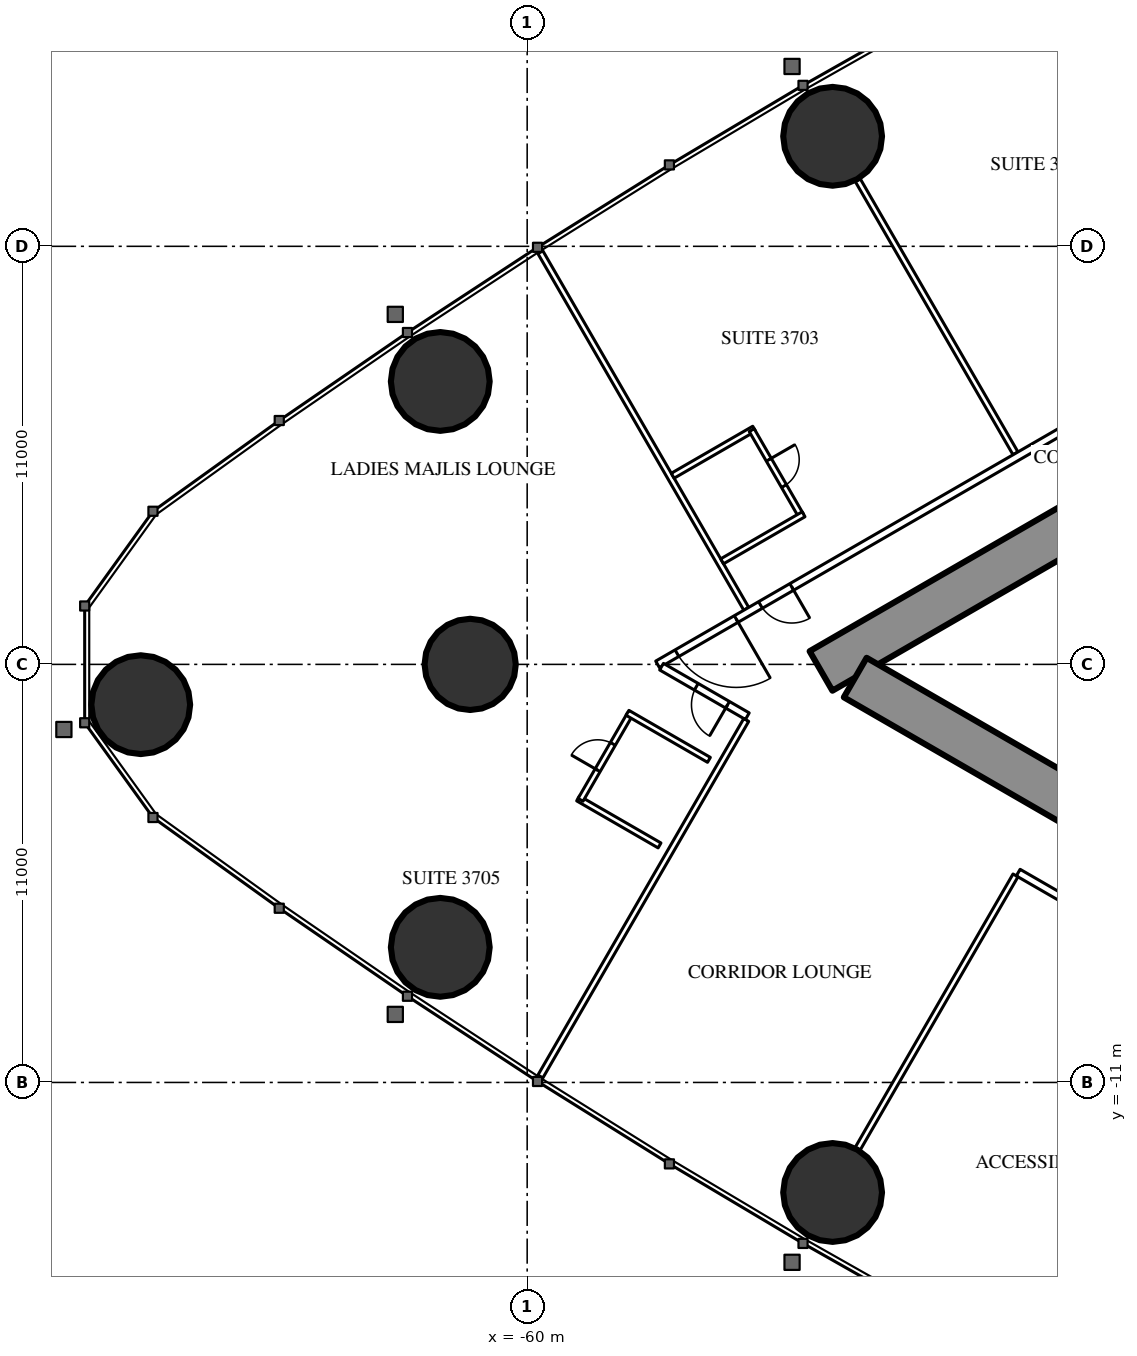
"""IFC4 building model, lengths in metres.
Left out: names, types, materials, properties, quantities, classifications, styles, units other than length and angle.
Written with IfcOpenShell. Run it as: python <this file> out.ifc"""

import sys

from ifc_helpers import new_model, si_unit, direction, frame, frame_2d, origin, origin_2d, place, context, subcontext, project, spatial, rectangle, circle, hollow_circle, extrude, element, fill, save


model = new_model("IFC4")
c1 = context("Model", 3, precision=1e-05, world=origin(), true_north=direction((0.0, 1.0)))
c2 = subcontext(c1, "Body", "Model", "MODEL_VIEW")
j1 = project(units=[si_unit("LENGTHUNIT", "METRE"), si_unit("PLANEANGLEUNIT", "RADIAN")], contexts=[c1])
p1 = place(None, origin())
s1 = spatial("IfcSite", under=j1, at=p1, CompositionType="ELEMENT")
p2 = place(p1, origin())
s2 = spatial("IfcBuilding", under=s1, at=p2, CompositionType="ELEMENT")
p3 = place(p2, frame((0.0, 0.0, 139.6)))
s3 = spatial("IfcBuildingStorey", under=s2, at=p3, CompositionType="ELEMENT", Elevation=139.6)
for number, where, z_axis, x_axis in (
    (1, (-70.168, -1.06, 0.0), (0.0, 0.0, 1.0), (1.0, 0.0, 0.0)),
    (2, (-62.287, -7.445, 0.0), (0.0, 0.0, 1.0), (1.0, 0.0, 0.0)),
    (3, (-51.963, -13.895, 0.0), (0.0, 0.0, 1.0), (1.0, 0.0, 0.0)),
    (4, (-51.963, 13.895, 0.0), (0.0, 0.0, 1.0), (1.0, 0.0, 0.0)),
    (5, (-62.287, 7.445, 0.0), (0.0, 0.0, 1.0), (1.0, 0.0, 0.0)),
):
    element("IfcColumn", number, at=place(p3, frame(where, z_axis=z_axis, x_axis=x_axis)), inside=s3, PredefinedType="COLUMN", context=c2, shape_type="SweptSolid", body=[
        extrude(hollow_circle(Radius=1.3, WallThickness=0.1, at=origin_2d()), origin(), (0.0, 0.0, 1.0), 3.5),
    ])
p4 = place(p3, frame((-61.5, 0.0, 0.0), z_axis=(0.0, 0.0, 1.0), x_axis=(1.0, 0.0, 0.0)))
e6 = element("IfcColumn", 6, at=p4, inside=s3, PredefinedType="COLUMN", context=c2, shape_type="SweptSolid", body=[
    extrude(circle(Radius=1.2, at=origin_2d()), origin(), (0.0, 0.0, 1.0), 3.5),
])
p5 = place(p3, frame((-27.2, 14.3, 0.0), z_axis=(0.0, 0.0, 1.0), x_axis=(-0.866026593062, -0.499997940104, 0.0)))
e7 = element("IfcWall", 7, at=p5, inside=s3, PredefinedType="SHEAR", context=c2, shape_type="SweptSolid", body=[
    extrude(rectangle(XDim=28.946, YDim=1.2, at=frame_2d((14.473, 0.0))), origin(), (0.0, 0.0, 1.0), 3.5),
])
p6 = place(p5, frame((4.6, 0.0, 0.0)))
e8 = element("IfcOpeningElement", 8, at=p6, cuts=e7, PredefinedType="OPENING", context=c2, shape_type="SweptSolid", body=[
    extrude(rectangle(XDim=1.0, YDim=2.2, at=frame_2d((0.5, 1.1))), frame((0.0, 0.61, 0.0), z_axis=(0.0, -1.0, 0.0), x_axis=(1.0, 0.0, 0.0)), (0.0, 0.0, 1.0), 1.22),
])
p7 = place(p5, frame((13.395, 0.0, 0.0)))
e9 = element("IfcOpeningElement", 9, at=p7, cuts=e7, PredefinedType="OPENING", context=c2, shape_type="SweptSolid", body=[
    extrude(rectangle(XDim=1.8, YDim=2.2, at=frame_2d((0.9, 1.1))), frame((0.0, 0.61, 0.0), z_axis=(0.0, -1.0, 0.0), x_axis=(1.0, 0.0, 0.0)), (0.0, 0.0, 1.0), 1.22),
])
p8 = place(p3, frame((-27.2, -14.3, 0.0), z_axis=(0.0, 0.0, 1.0), x_axis=(-0.866024021859, 0.500002393557, 0.0)))
e10 = element("IfcWall", 10, at=p8, inside=s3, PredefinedType="SHEAR", context=c2, shape_type="SweptSolid", body=[
    extrude(rectangle(XDim=27.907, YDim=1.2, at=frame_2d((13.954, 0.0))), origin(), (0.0, 0.0, 1.0), 3.5),
])
p9 = place(p8, frame((4.6, 0.0, 0.0)))
e11 = element("IfcOpeningElement", 11, at=p9, cuts=e10, PredefinedType="OPENING", context=c2, shape_type="SweptSolid", body=[
    extrude(rectangle(XDim=1.0, YDim=2.2, at=frame_2d((0.5, 1.1))), frame((0.0, 0.61, 0.0), z_axis=(0.0, -1.0, 0.0), x_axis=(1.0, 0.0, 0.0)), (0.0, 0.0, 1.0), 1.22),
])
p10 = place(p8, frame((13.395, 0.0, 0.0)))
e12 = element("IfcOpeningElement", 12, at=p10, cuts=e10, PredefinedType="OPENING", context=c2, shape_type="SweptSolid", body=[
    extrude(rectangle(XDim=1.8, YDim=2.2, at=frame_2d((0.9, 1.1))), frame((0.0, 0.61, 0.0), z_axis=(0.0, -1.0, 0.0), x_axis=(1.0, 0.0, 0.0)), (0.0, 0.0, 1.0), 1.22),
])
p11 = place(p3, frame((-47.151, 5.552, 0.0), z_axis=(0.0, 0.0, 1.0), x_axis=(-0.500003012045, 0.866023664773, 0.0)))
e13 = element("IfcWall", 13, at=p11, inside=s3, PredefinedType="PARTITIONING", context=c2, shape_type="SweptSolid", body=[
    extrude(rectangle(XDim=8.311, YDim=0.15, at=frame_2d((4.156, 0.0))), origin(), (0.0, 0.0, 1.0), 2.2),
])
p12 = place(p3, frame((-54.236, 1.462, 0.0), z_axis=(0.0, 0.0, 1.0), x_axis=(-0.499990351854, 0.866030974073, 0.0)))
e14 = element("IfcWall", 14, at=p12, inside=s3, PredefinedType="PARTITIONING", context=c2, shape_type="SweptSolid", body=[
    extrude(rectangle(XDim=10.834, YDim=0.15, at=frame_2d((5.417, 0.0))), origin(), (0.0, 0.0, 1.0), 3.25),
])
p13 = place(p3, frame((-47.151, -5.552, 0.0), z_axis=(0.0, 0.0, 1.0), x_axis=(-0.500003012045, -0.866023664773, 0.0)))
e15 = element("IfcWall", 15, at=p13, inside=s3, PredefinedType="PARTITIONING", context=c2, shape_type="SweptSolid", body=[
    extrude(rectangle(XDim=8.311, YDim=0.15, at=frame_2d((4.156, 0.0))), origin(), (0.0, 0.0, 1.0), 2.2),
])
p14 = place(p3, frame((-54.236, -1.462, 0.0), z_axis=(0.0, 0.0, 1.0), x_axis=(-0.499990351854, -0.866030974073, 0.0)))
e16 = element("IfcWall", 16, at=p14, inside=s3, PredefinedType="PARTITIONING", context=c2, shape_type="SweptSolid", body=[
    extrude(rectangle(XDim=10.834, YDim=0.15, at=frame_2d((5.417, 0.0))), origin(), (0.0, 0.0, 1.0), 3.25),
])
p15 = place(p3, frame((-37.7, 10.894, 0.0), z_axis=(0.0, 0.0, 1.0), x_axis=(-0.866027905338, -0.499995667157, 0.0)))
e17 = element("IfcWall", 17, at=p15, inside=s3, PredefinedType="PARTITIONING", context=c2, shape_type="SweptSolid", body=[
    extrude(rectangle(XDim=21.787, YDim=0.2, at=frame_2d((10.894, 0.0))), origin(), (0.0, 0.0, 1.0), 3.25),
])
p16 = place(p15, frame((17.711, 0.0, 0.0)))
e18 = element("IfcOpeningElement", 18, at=p16, cuts=e17, PredefinedType="OPENING", context=c2, shape_type="SweptSolid", body=[
    extrude(rectangle(XDim=0.95, YDim=2.2, at=frame_2d((0.475, 1.1))), frame((0.0, 0.11, 0.0), z_axis=(0.0, -1.0, 0.0), x_axis=(1.0, 0.0, 0.0)), (0.0, 0.0, 1.0), 0.22),
])
p17 = place(p15, frame((19.399, 0.0, 0.0)))
e19 = element("IfcOpeningElement", 19, at=p17, cuts=e17, PredefinedType="OPENING", context=c2, shape_type="SweptSolid", body=[
    extrude(rectangle(XDim=1.8, YDim=2.2, at=frame_2d((0.9, 1.1))), frame((0.0, 0.11, 0.0), z_axis=(0.0, -1.0, 0.0), x_axis=(1.0, 0.0, 0.0)), (0.0, 0.0, 1.0), 0.22),
])
p18 = place(p15, frame((0.6, 0.0, 0.0)))
e20 = element("IfcOpeningElement", 20, at=p18, cuts=e17, PredefinedType="OPENING", context=c2, shape_type="SweptSolid", body=[
    extrude(rectangle(XDim=0.95, YDim=2.2, at=frame_2d((0.475, 1.1))), frame((0.0, 0.11, 0.0), z_axis=(0.0, -1.0, 0.0), x_axis=(1.0, 0.0, 0.0)), (0.0, 0.0, 1.0), 0.22),
])
p19 = place(p3, frame((-36.92, -11.344, 0.0), z_axis=(0.0, 0.0, 1.0), x_axis=(-0.866027897759, 0.499995680284, 0.0)))
e21 = element("IfcWall", 21, at=p19, inside=s3, PredefinedType="PARTITIONING", context=c2, shape_type="SweptSolid", body=[
    extrude(rectangle(XDim=11.731, YDim=0.2, at=frame_2d((5.865, 0.0))), origin(), (0.0, 0.0, 1.0), 3.25),
])
p20 = place(p19, frame((3.35, 0.0, 0.0)))
e22 = element("IfcOpeningElement", 22, at=p20, cuts=e21, PredefinedType="OPENING", context=c2, shape_type="SweptSolid", body=[
    extrude(rectangle(XDim=1.0, YDim=2.2, at=frame_2d((0.5, 1.1))), frame((0.0, 0.11, 0.0), z_axis=(0.0, -1.0, 0.0), x_axis=(1.0, 0.0, 0.0)), (0.0, 0.0, 1.0), 0.22),
])
p21 = place(p3, frame((-54.207, -1.363, 0.0), z_axis=(0.0, 0.0, 1.0), x_axis=(-0.866049872286, 0.499957616916, 0.0)))
e23 = element("IfcWall", 23, at=p21, inside=s3, PredefinedType="PARTITIONING", context=c2, shape_type="SweptSolid", body=[
    extrude(rectangle(XDim=2.606, YDim=0.2, at=frame_2d((1.303, 0.0))), origin(), (0.0, 0.0, 1.0), 3.25),
])
p22 = place(p21, frame((0.6, 0.0, 0.0)))
e24 = element("IfcOpeningElement", 24, at=p22, cuts=e23, PredefinedType="OPENING", context=c2, shape_type="SweptSolid", body=[
    extrude(rectangle(XDim=0.95, YDim=2.2, at=frame_2d((0.475, 1.1))), frame((0.0, 0.11, 0.0), z_axis=(0.0, -1.0, 0.0), x_axis=(1.0, 0.0, 0.0)), (0.0, 0.0, 1.0), 0.22),
])
p23 = place(p3, frame((-54.027, 6.201, 0.0), z_axis=(0.0, 0.0, 1.0), x_axis=(-0.866006523861, -0.500032699561, 0.0)))
e25 = element("IfcWall", 25, at=p23, inside=s3, PredefinedType="PARTITIONING", context=c2, shape_type="SweptSolid", body=[
    extrude(rectangle(XDim=2.475, YDim=0.15, at=frame_2d((1.237, 0.0))), origin(), (0.0, 0.0, 1.0), 3.25),
])
p24 = place(p3, frame((-52.792, 3.912, 0.0), z_axis=(0.0, 0.0, 1.0), x_axis=(-0.500006934395, 0.866021400173, 0.0)))
e26 = element("IfcWall", 26, at=p24, inside=s3, PredefinedType="PARTITIONING", context=c2, shape_type="SweptSolid", body=[
    extrude(rectangle(XDim=2.6, YDim=0.15, at=frame_2d((1.3, 0.0))), origin(), (0.0, 0.0, 1.0), 3.25),
])
p25 = place(p24, frame((0.9, 0.0, 0.0)))
e27 = element("IfcOpeningElement", 27, at=p25, cuts=e26, PredefinedType="OPENING", context=c2, shape_type="SweptSolid", body=[
    extrude(rectangle(XDim=0.8, YDim=2.2, at=frame_2d((0.4, 1.1))), frame((0.0, 0.085, 0.0), z_axis=(0.0, -1.0, 0.0), x_axis=(1.0, 0.0, 0.0)), (0.0, 0.0, 1.0), 0.17),
])
p26 = place(p3, frame((-52.727, 3.95, 0.0), z_axis=(0.0, 0.0, 1.0), x_axis=(-0.866006523861, -0.500032699561, 0.0)))
e28 = element("IfcWall", 28, at=p26, inside=s3, PredefinedType="PARTITIONING", context=c2, shape_type="SweptSolid", body=[
    extrude(rectangle(XDim=2.475, YDim=0.15, at=frame_2d((1.237, 0.0))), origin(), (0.0, 0.0, 1.0), 3.25),
])
p27 = place(p3, frame((-56.517, -4.764, 0.0), z_axis=(0.0, 0.0, 1.0), x_axis=(-0.866031185235, 0.4999899861, 0.0)))
e29 = element("IfcWall", 29, at=p27, inside=s3, PredefinedType="PARTITIONING", context=c2, shape_type="SweptSolid", body=[
    extrude(rectangle(XDim=2.475, YDim=0.15, at=frame_2d((1.238, 0.0))), origin(), (0.0, 0.0, 1.0), 3.25),
])
p28 = place(p3, frame((-57.296, -1.312, 0.0), z_axis=(0.0, 0.0, 1.0), x_axis=(-0.49997716683, -0.86603858612, 0.0)))
e30 = element("IfcWall", 30, at=p28, inside=s3, PredefinedType="PARTITIONING", context=c2, shape_type="SweptSolid", body=[
    extrude(rectangle(XDim=2.6, YDim=0.15, at=frame_2d((1.3, 0.0))), origin(), (0.0, 0.0, 1.0), 3.25),
])
p29 = place(p28, frame((0.9, 0.0, 0.0)))
e31 = element("IfcOpeningElement", 31, at=p29, cuts=e30, PredefinedType="OPENING", context=c2, shape_type="SweptSolid", body=[
    extrude(rectangle(XDim=0.8, YDim=2.2, at=frame_2d((0.4, 1.1))), frame((0.0, 0.085, 0.0), z_axis=(0.0, -1.0, 0.0), x_axis=(1.0, 0.0, 0.0)), (0.0, 0.0, 1.0), 0.17),
])
p30 = place(p3, frame((-55.217, -2.512, 0.0), z_axis=(0.0, 0.0, 1.0), x_axis=(-0.866031185235, 0.4999899861, 0.0)))
e32 = element("IfcWall", 32, at=p30, inside=s3, PredefinedType="PARTITIONING", context=c2, shape_type="SweptSolid", body=[
    extrude(rectangle(XDim=2.475, YDim=0.15, at=frame_2d((1.238, 0.0))), origin(), (0.0, 0.0, 1.0), 3.25),
])
p31 = place(p25, origin())
e33 = element("IfcDoor", 33, at=p31, inside=s3, OperationType="SINGLE_SWING_RIGHT", PredefinedType="DOOR", context=c2, shape_type="SweptSolid", body=[
    extrude(rectangle(XDim=0.8, YDim=2.2, at=frame_2d((0.4, 1.1))), frame((0.0, 0.025, 0.0), z_axis=(0.0, -1.0, 0.0), x_axis=(1.0, 0.0, 0.0)), (0.0, 0.0, 1.0), 0.05),
])
fill(e27, e33)
p32 = place(p16, origin())
e34 = element("IfcDoor", 34, at=p32, inside=s3, OperationType="SINGLE_SWING_LEFT", PredefinedType="DOOR", context=c2, shape_type="SweptSolid", body=[
    extrude(rectangle(XDim=0.95, YDim=2.2, at=frame_2d((0.475, 1.1))), frame((0.0, 0.025, 0.0), z_axis=(0.0, -1.0, 0.0), x_axis=(1.0, 0.0, 0.0)), (0.0, 0.0, 1.0), 0.05),
])
fill(e18, e34)
p33 = place(p17, origin())
e35 = element("IfcDoor", 35, at=p33, inside=s3, OperationType="DOUBLE_DOOR_SINGLE_SWING", PredefinedType="DOOR", context=c2, shape_type="SweptSolid", body=[
    extrude(rectangle(XDim=1.8, YDim=2.2, at=frame_2d((0.9, 1.1))), frame((0.0, 0.025, 0.0), z_axis=(0.0, -1.0, 0.0), x_axis=(1.0, 0.0, 0.0)), (0.0, 0.0, 1.0), 0.05),
])
fill(e19, e35)
p34 = place(p29, origin())
e36 = element("IfcDoor", 36, at=p34, inside=s3, OperationType="SINGLE_SWING_RIGHT", PredefinedType="DOOR", context=c2, shape_type="SweptSolid", body=[
    extrude(rectangle(XDim=0.8, YDim=2.2, at=frame_2d((0.4, 1.1))), frame((0.0, 0.025, 0.0), z_axis=(0.0, -1.0, 0.0), x_axis=(1.0, 0.0, 0.0)), (0.0, 0.0, 1.0), 0.05),
])
fill(e31, e36)
p35 = place(p22, origin())
e37 = element("IfcDoor", 37, at=p35, inside=s3, OperationType="SINGLE_SWING_LEFT", PredefinedType="DOOR", context=c2, shape_type="SweptSolid", body=[
    extrude(rectangle(XDim=0.95, YDim=2.2, at=frame_2d((0.475, 1.1))), frame((0.0, 0.025, 0.0), z_axis=(0.0, -1.0, 0.0), x_axis=(1.0, 0.0, 0.0)), (0.0, 0.0, 1.0), 0.05),
])
fill(e24, e37)
save(model, sys.argv[1])
